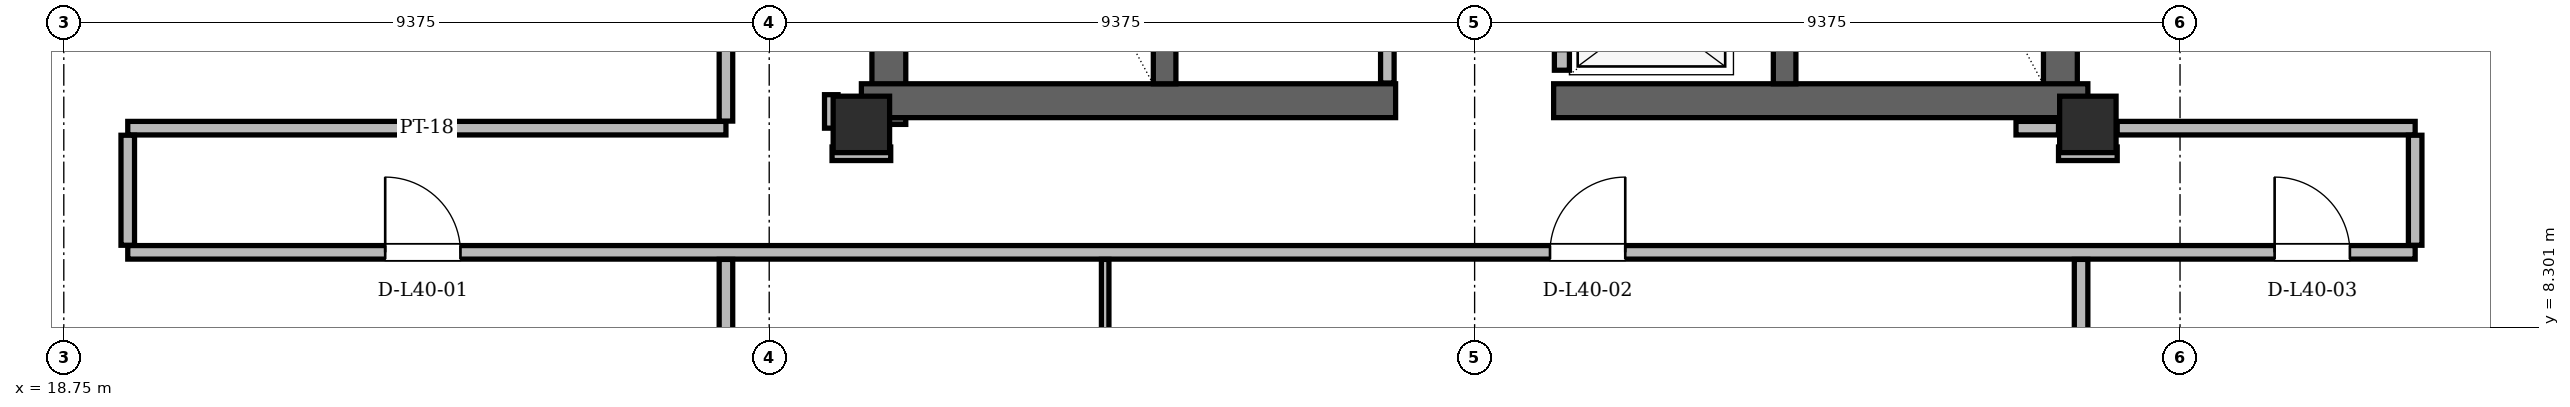
"""IFC4 building model, lengths in metres.
Left out: names, types, materials, properties, quantities, classifications, styles, units other than length and angle.
Written with IfcOpenShell. Run it as: python <this file> out.ifc"""

import sys

from ifc_helpers import new_model, si_unit, direction, frame, frame_2d, origin, origin_2d, place, context, subcontext, project, spatial, rectangle, hollow_rectangle, extrude, element, fill, save


model = new_model("IFC4")
c1 = context("Model", 3, precision=1e-05, world=origin(), true_north=direction((0.0, 1.0)))
c2 = subcontext(c1, "Body", "Model", "MODEL_VIEW")
j1 = project(units=[si_unit("LENGTHUNIT", "METRE"), si_unit("PLANEANGLEUNIT", "RADIAN")], contexts=[c1])
p1 = place(None, origin())
s1 = spatial("IfcSite", under=j1, at=p1, CompositionType="ELEMENT")
p2 = place(p1, origin())
s2 = spatial("IfcBuilding", under=s1, at=p2, CompositionType="ELEMENT")
p3 = place(p2, frame((0.0, 0.0, 153.0)))
s3 = spatial("IfcBuildingStorey", under=s2, at=p3, CompositionType="ELEMENT", Elevation=153.0)
for number, where, z_axis, x_axis in (
    (1, (29.35, 11.0, 0.0), (0.0, 0.0, 1.0), (1.0, 0.0, 0.0)),
    (2, (45.65, 11.0, 0.0), (0.0, 0.0, 1.0), (1.0, 0.0, 0.0)),
):
    element("IfcColumn", number, at=place(p3, frame(where, z_axis=z_axis, x_axis=x_axis)), inside=s3, PredefinedType="COLUMN", context=c2, shape_type="SweptSolid", body=[
        extrude(hollow_rectangle(XDim=0.75, YDim=0.75, WallThickness=0.06, at=origin_2d()), origin(), (0.0, 0.0, 1.0), 3.6),
    ])
for number, where, z_axis, x_axis in (
    (3, (29.715, 11.0, 0.0), (0.0, 0.0, 1.0), (0.0, 1.0, 0.0)),
    (4, (45.285, 11.0, 0.0), (0.0, 0.0, 1.0), (0.0, 1.0, 0.0)),
):
    element("IfcWall", number, at=place(p3, frame(where, z_axis=z_axis, x_axis=x_axis)), inside=s3, PredefinedType="SHEAR", context=c2, shape_type="SweptSolid", body=[
        extrude(rectangle(XDim=13.3, YDim=0.45, at=frame_2d((6.65, 0.0))), origin(), (0.0, 0.0, 1.0), 3.38),
    ])
for number, where, z_axis, x_axis in (
    (5, (29.35, 11.315, 0.0), (0.0, 0.0, 1.0), (1.0, 0.0, 0.0)),
    (6, (38.55, 11.315, 0.0), (0.0, 0.0, 1.0), (1.0, 0.0, 0.0)),
):
    element("IfcWall", number, at=place(p3, frame(where, z_axis=z_axis, x_axis=x_axis)), inside=s3, PredefinedType="SHEAR", context=c2, shape_type="SweptSolid", body=[
        extrude(rectangle(XDim=7.1, YDim=0.45, at=frame_2d((3.55, 0.0))), origin(), (0.0, 0.0, 1.0), 3.38),
    ])
for number, where, z_axis, x_axis in (
    (7, (33.38, 11.54, 0.0), (0.0, 0.0, 1.0), (0.0, 1.0, 0.0)),
    (8, (41.62, 11.54, 0.0), (0.0, 0.0, 1.0), (0.0, 1.0, 0.0)),
):
    element("IfcWall", number, at=place(p3, frame(where, z_axis=z_axis, x_axis=x_axis)), inside=s3, PredefinedType="SHEAR", context=c2, shape_type="SweptSolid", body=[
        extrude(rectangle(XDim=7.62, YDim=0.3, at=frame_2d((3.81, 0.0))), origin(), (0.0, 0.0, 1.0), 3.38),
    ])
p4 = place(p3, frame((15.048, 12.544, 0.0), z_axis=(0.0, 0.0, 1.0), x_axis=(0.499991763293, -0.866030159197, 0.0)))
e9 = element("IfcWall", 9, at=p4, inside=s3, PredefinedType="SOLIDWALL", context=c2, shape_type="SweptSolid", body=[
    extrude(rectangle(XDim=9.365, YDim=0.34, at=frame_2d((4.682, 0.0))), origin(), (0.0, 0.0, 1.0), 2.6),
])
p5 = place(p3, frame((36.34, 11.55, 0.0), z_axis=(0.0, 0.0, 1.0), x_axis=(0.0, 1.0, 0.0)))
e10 = element("IfcWall", 10, at=p5, inside=s3, PredefinedType="PARTITIONING", context=c2, shape_type="SweptSolid", body=[
    extrude(rectangle(XDim=5.55, YDim=0.18, at=frame_2d((2.775, 0.0))), origin(), (0.0, 0.0, 1.0), 3.38),
])
p6 = place(p5, frame((2.85, 0.0, 0.0)))
e11 = element("IfcOpeningElement", 11, at=p6, cuts=e10, PredefinedType="OPENING", context=c2, shape_type="SweptSolid", body=[
    extrude(rectangle(XDim=0.95, YDim=2.1, at=frame_2d((0.475, 1.05))), frame((0.0, 0.09, 0.0), z_axis=(0.0, -1.0, 0.0), x_axis=(1.0, 0.0, 0.0)), (0.0, 0.0, 1.0), 0.18),
])
p7 = place(p3, frame((38.66, 11.72, 0.0), z_axis=(0.0, 0.0, 1.0), x_axis=(0.0, 1.0, 0.0)))
e12 = element("IfcWall", 12, at=p7, inside=s3, PredefinedType="PARTITIONING", context=c2, shape_type="SweptSolid", body=[
    extrude(rectangle(XDim=9.1, YDim=0.2, at=frame_2d((4.55, 0.0))), origin(), (0.0, 0.0, 1.0), 3.38),
])
p8 = place(p7, frame((0.255, 0.0, 0.0)))
e13 = element("IfcOpeningElement", 13, at=p8, cuts=e12, PredefinedType="OPENING", context=c2, shape_type="SweptSolid", body=[
    extrude(rectangle(XDim=1.05, YDim=2.15, at=frame_2d((0.525, 1.075))), frame((0.0, 0.1, 0.0), z_axis=(0.0, -1.0, 0.0), x_axis=(1.0, 0.0, 0.0)), (0.0, 0.0, 1.0), 0.2),
])
p9 = place(p7, frame((2.105, 0.0, 0.0)))
e14 = element("IfcOpeningElement", 14, at=p9, cuts=e12, PredefinedType="OPENING", context=c2, shape_type="SweptSolid", body=[
    extrude(rectangle(XDim=1.05, YDim=2.15, at=frame_2d((0.525, 1.075))), frame((0.0, 0.1, 0.0), z_axis=(0.0, -1.0, 0.0), x_axis=(1.0, 0.0, 0.0)), (0.0, 0.0, 1.0), 0.2),
])
p10 = place(p7, frame((3.955, 0.0, 0.0)))
e15 = element("IfcOpeningElement", 15, at=p10, cuts=e12, PredefinedType="OPENING", context=c2, shape_type="SweptSolid", body=[
    extrude(rectangle(XDim=1.05, YDim=2.15, at=frame_2d((0.525, 1.075))), frame((0.0, 0.1, 0.0), z_axis=(0.0, -1.0, 0.0), x_axis=(1.0, 0.0, 0.0)), (0.0, 0.0, 1.0), 0.2),
])
p11 = place(p3, frame((19.6, 9.3, 0.0), z_axis=(0.0, 0.0, 1.0), x_axis=(1.0, 0.0, 0.0)))
e16 = element("IfcWall", 16, at=p11, inside=s3, PredefinedType="PARTITIONING", context=c2, shape_type="SweptSolid", body=[
    extrude(rectangle(XDim=30.4, YDim=0.18, at=frame_2d((15.2, 0.0))), origin(), (0.0, 0.0, 1.0), 2.842),
])
p12 = place(p11, frame((3.421, 0.0, 0.0)))
e17 = element("IfcOpeningElement", 17, at=p12, cuts=e16, PredefinedType="OPENING", context=c2, shape_type="SweptSolid", body=[
    extrude(rectangle(XDim=1.0, YDim=2.18, at=frame_2d((0.5, 1.09))), frame((0.0, 0.09, 0.0), z_axis=(0.0, -1.0, 0.0), x_axis=(1.0, 0.0, 0.0)), (0.0, 0.0, 1.0), 0.18),
])
p13 = place(p11, frame((18.902, 0.0, 0.0)))
e18 = element("IfcOpeningElement", 18, at=p13, cuts=e16, PredefinedType="OPENING", context=c2, shape_type="SweptSolid", body=[
    extrude(rectangle(XDim=1.0, YDim=2.18, at=frame_2d((0.5, 1.09))), frame((0.0, 0.09, 0.0), z_axis=(0.0, -1.0, 0.0), x_axis=(1.0, 0.0, 0.0)), (0.0, 0.0, 1.0), 0.18),
])
p14 = place(p11, frame((28.532, 0.0, 0.0)))
e19 = element("IfcOpeningElement", 19, at=p14, cuts=e16, PredefinedType="OPENING", context=c2, shape_type="SweptSolid", body=[
    extrude(rectangle(XDim=1.0, YDim=2.18, at=frame_2d((0.5, 1.09))), frame((0.0, 0.09, 0.0), z_axis=(0.0, -1.0, 0.0), x_axis=(1.0, 0.0, 0.0)), (0.0, 0.0, 1.0), 0.18),
])
for number, where, z_axis, x_axis in (
    (20, (28.96, 10.61, 0.0), (0.0, 0.0, 1.0), (1.0, 0.0, 0.0)),
    (21, (45.26, 10.61, 0.0), (0.0, 0.0, 1.0), (1.0, 0.0, 0.0)),
):
    element("IfcWall", number, at=place(p3, frame(where, z_axis=z_axis, x_axis=x_axis)), inside=s3, PredefinedType="PARTITIONING", context=c2, shape_type="SweptSolid", body=[
        extrude(rectangle(XDim=0.78, YDim=0.18, at=frame_2d((0.39, 0.0))), origin(), (0.0, 0.0, 1.0), 3.38),
    ])
p15 = place(p3, frame((19.6, 10.95, 0.0), z_axis=(0.0, 0.0, 1.0), x_axis=(1.0, 0.0, 0.0)))
e22 = element("IfcWall", 22, at=p15, inside=s3, PredefinedType="PARTITIONING", context=c2, shape_type="SweptSolid", body=[
    extrude(rectangle(XDim=7.95, YDim=0.18, at=frame_2d((3.975, 0.0))), origin(), (0.0, 0.0, 1.0), 3.38),
])
p16 = place(p3, frame((44.695, 10.95, 0.0), z_axis=(0.0, 0.0, 1.0), x_axis=(1.0, 0.0, 0.0)))
e23 = element("IfcWall", 23, at=p16, inside=s3, PredefinedType="PARTITIONING", context=c2, shape_type="SweptSolid", body=[
    extrude(rectangle(XDim=0.565, YDim=0.18, at=frame_2d((0.282, 0.0))), origin(), (0.0, 0.0, 1.0), 2.42),
])
p17 = place(p3, frame((46.04, 10.95, 0.0), z_axis=(0.0, 0.0, 1.0), x_axis=(1.0, 0.0, 0.0)))
e24 = element("IfcWall", 24, at=p17, inside=s3, PredefinedType="PARTITIONING", context=c2, shape_type="SweptSolid", body=[
    extrude(rectangle(XDim=3.96, YDim=0.18, at=frame_2d((1.98, 0.0))), origin(), (0.0, 0.0, 1.0), 2.842),
])
p18 = place(p3, frame((19.6, 9.394, 0.0), z_axis=(0.0, 0.0, 1.0), x_axis=(0.0, 1.0, 0.0)))
e25 = element("IfcWall", 25, at=p18, inside=s3, PredefinedType="PARTITIONING", context=c2, shape_type="SweptSolid", body=[
    extrude(rectangle(XDim=1.462, YDim=0.18, at=frame_2d((0.731, 0.0))), origin(), (0.0, 0.0, 1.0), 3.38),
])
p19 = place(p3, frame((27.55, 4.608, 0.0), z_axis=(0.0, 0.0, 1.0), x_axis=(0.0, 1.0, 0.0)))
e26 = element("IfcWall", 26, at=p19, inside=s3, PredefinedType="PARTITIONING", context=c2, shape_type="SweptSolid", body=[
    extrude(rectangle(XDim=4.598, YDim=0.18, at=frame_2d((2.299, 0.0))), origin(), (0.0, 0.0, 1.0), 2.966),
])
p20 = place(p3, frame((27.55, 11.044, 0.0), z_axis=(0.0, 0.0, 1.0), x_axis=(0.0, 1.0, 0.0)))
e27 = element("IfcWall", 27, at=p20, inside=s3, PredefinedType="PARTITIONING", context=c2, shape_type="SweptSolid", body=[
    extrude(rectangle(XDim=5.712, YDim=0.18, at=frame_2d((2.856, 0.0))), origin(), (0.0, 0.0, 1.0), 2.842),
])
p21 = place(p3, frame((28.95, 10.95, 0.0), z_axis=(0.0, 0.0, 1.0), x_axis=(0.0, 1.0, 0.0)))
e28 = element("IfcWall", 28, at=p21, inside=s3, PredefinedType="PARTITIONING", context=c2, shape_type="SweptSolid", body=[
    extrude(rectangle(XDim=0.445, YDim=0.18, at=frame_2d((0.223, 0.0))), origin(), (0.0, 0.0, 1.0), 2.842),
])
p22 = place(p3, frame((32.59, 4.608, 0.0), z_axis=(0.0, 0.0, 1.0), x_axis=(0.0, 1.0, 0.0)))
e29 = element("IfcWall", 29, at=p22, inside=s3, PredefinedType="PARTITIONING", context=c2, shape_type="SweptSolid", body=[
    extrude(rectangle(XDim=4.598, YDim=0.1, at=frame_2d((2.299, 0.0))), origin(), (0.0, 0.0, 1.0), 2.966),
])
p23 = place(p22, frame((1.894, 0.0, 0.0)))
e30 = element("IfcOpeningElement", 30, at=p23, cuts=e29, PredefinedType="OPENING", context=c2, shape_type="SweptSolid", body=[
    extrude(rectangle(XDim=0.88, YDim=2.08, at=frame_2d((0.44, 1.04))), frame((0.0, 0.05, 0.0), z_axis=(0.0, -1.0, 0.0), x_axis=(1.0, 0.0, 0.0)), (0.0, 0.0, 1.0), 0.1),
])
p24 = place(p3, frame((45.56, 4.608, 0.0), z_axis=(0.0, 0.0, 1.0), x_axis=(0.0, 1.0, 0.0)))
e31 = element("IfcWall", 31, at=p24, inside=s3, PredefinedType="PARTITIONING", context=c2, shape_type="SweptSolid", body=[
    extrude(rectangle(XDim=4.598, YDim=0.18, at=frame_2d((2.299, 0.0))), origin(), (0.0, 0.0, 1.0), 2.966),
])
p25 = place(p3, frame((50.0, 9.394, 0.0), z_axis=(0.0, 0.0, 1.0), x_axis=(0.0, 1.0, 0.0)))
e32 = element("IfcWall", 32, at=p25, inside=s3, PredefinedType="PARTITIONING", context=c2, shape_type="SweptSolid", body=[
    extrude(rectangle(XDim=1.462, YDim=0.18, at=frame_2d((0.731, 0.0))), origin(), (0.0, 0.0, 1.0), 3.38),
])
p26 = place(p12, origin())
e33 = element("IfcDoor", 33, at=p26, inside=s3, OperationType="SINGLE_SWING_LEFT", PredefinedType="DOOR", context=c2, shape_type="SweptSolid", body=[
    extrude(rectangle(XDim=1.0, YDim=2.18, at=frame_2d((0.5, 1.09))), frame((0.0, 0.025, 0.0), z_axis=(0.0, -1.0, 0.0), x_axis=(1.0, 0.0, 0.0)), (0.0, 0.0, 1.0), 0.05),
])
fill(e17, e33)
p27 = place(p13, origin())
e34 = element("IfcDoor", 34, at=p27, inside=s3, OperationType="SINGLE_SWING_RIGHT", PredefinedType="DOOR", context=c2, shape_type="SweptSolid", body=[
    extrude(rectangle(XDim=1.0, YDim=2.18, at=frame_2d((0.5, 1.09))), frame((0.0, 0.025, 0.0), z_axis=(0.0, -1.0, 0.0), x_axis=(1.0, 0.0, 0.0)), (0.0, 0.0, 1.0), 0.05),
])
fill(e18, e34)
p28 = place(p14, origin())
e35 = element("IfcDoor", 35, at=p28, inside=s3, OperationType="SINGLE_SWING_LEFT", PredefinedType="DOOR", context=c2, shape_type="SweptSolid", body=[
    extrude(rectangle(XDim=1.0, YDim=2.18, at=frame_2d((0.5, 1.09))), frame((0.0, 0.025, 0.0), z_axis=(0.0, -1.0, 0.0), x_axis=(1.0, 0.0, 0.0)), (0.0, 0.0, 1.0), 0.05),
])
fill(e19, e35)
save(model, sys.argv[1])
